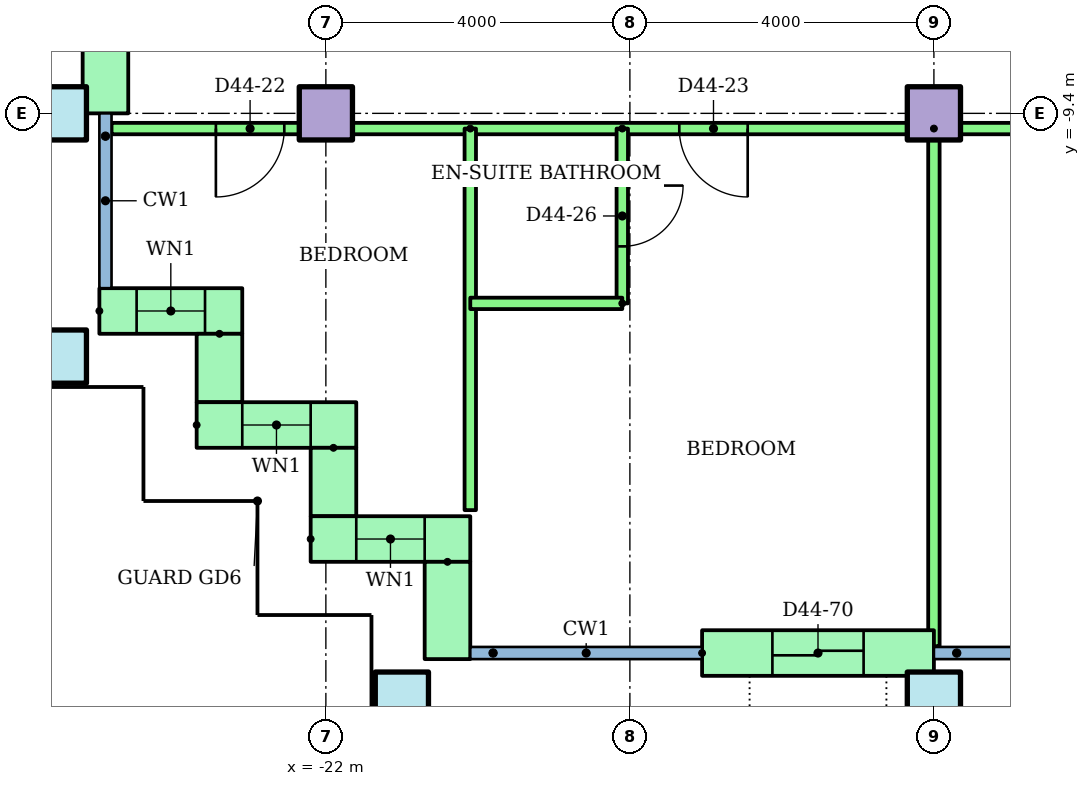
"""IFC4 building model, lengths in metres.
Left out: names, types, materials, properties, quantities, classifications, styles, units other than length and angle.
Written with IfcOpenShell. Run it as: python <this file> out.ifc"""

import sys

from ifc_helpers import new_model, si_unit, direction, frame, frame_2d, origin, origin_2d, place, context, subcontext, project, spatial, rectangle, hollow_rectangle, extrude, element, fill, save


model = new_model("IFC4")
c1 = context("Model", 3, precision=1e-05, world=origin(), true_north=direction((0.0, 1.0)))
c2 = subcontext(c1, "Body", "Model", "MODEL_VIEW")
j1 = project(units=[si_unit("LENGTHUNIT", "METRE"), si_unit("PLANEANGLEUNIT", "RADIAN")], contexts=[c1])
p1 = place(None, origin())
s1 = spatial("IfcSite", under=j1, at=p1, CompositionType="ELEMENT")
p2 = place(p1, origin())
s2 = spatial("IfcBuilding", under=s1, at=p2, CompositionType="ELEMENT")
p3 = place(p2, frame((0.0, 0.0, 171.7)))
s3 = spatial("IfcBuildingStorey", under=s2, at=p3, CompositionType="ELEMENT", Elevation=171.7)
for number, where in (
    (1, (-21.0, -17.1, 0.0)),
    (2, (-14.0, -17.1, 0.0)),
    (3, (-25.5, -12.6, 0.0)),
    (4, (-25.5, -9.4, 0.0)),
):
    element("IfcColumn", number, at=place(p3, frame(where)), inside=s3, PredefinedType="COLUMN", context=c2, shape_type="SweptSolid", body=[
        extrude(hollow_rectangle(XDim=0.7, YDim=0.7, WallThickness=0.036, at=origin_2d()), origin(), (0.0, 0.0, 1.0), 3.2),
    ])
for number, where in (
    (5, (-22.0, -9.4, 0.0)),
    (6, (-14.0, -9.4, 0.0)),
):
    element("IfcColumn", number, at=place(p3, frame(where)), inside=s3, PredefinedType="COLUMN", context=c2, shape_type="SweptSolid", body=[
        extrude(rectangle(XDim=0.7, YDim=0.7, at=origin_2d()), origin(), (0.0, 0.0, 1.0), 3.2),
    ])
p4 = place(p3, frame((-24.9, -5.7, 0.0), z_axis=(0.0, 0.0, 1.0), x_axis=(0.0, -1.0, 0.0)))
e7 = element("IfcWall", 7, at=p4, inside=s3, PredefinedType="STANDARD", context=c2, shape_type="SweptSolid", body=[
    extrude(rectangle(XDim=3.7, YDim=0.6, at=frame_2d((1.85, 0.0))), origin(), (0.0, 0.0, 1.0), 2.92),
])
p5 = place(p4, frame((1.025, 0.0, 0.0)))
e8 = element("IfcOpeningElement", 8, at=p5, cuts=e7, PredefinedType="OPENING", context=c2, shape_type="SweptSolid", body=[
    extrude(rectangle(XDim=1.2, YDim=2.1, at=frame_2d((0.6, 1.05))), frame((0.0, 0.31, 0.0), z_axis=(0.0, -1.0, 0.0), x_axis=(1.0, 0.0, 0.0)), (0.0, 0.0, 1.0), 0.62),
])
p6 = place(p3, frame((-24.98, -12.0, 0.0)))
e9 = element("IfcWall", 9, at=p6, inside=s3, PredefinedType="STANDARD", context=c2, shape_type="SweptSolid", body=[
    extrude(rectangle(XDim=1.88, YDim=0.6, at=frame_2d((0.94, 0.0))), origin(), (0.0, 0.0, 1.0), 2.92),
])
p7 = place(p6, frame((0.49, 0.0, 0.9)))
e10 = element("IfcOpeningElement", 10, at=p7, cuts=e9, PredefinedType="OPENING", context=c2, shape_type="SweptSolid", body=[
    extrude(rectangle(XDim=0.9, YDim=1.5, at=frame_2d((0.45, 0.75))), frame((0.0, 0.31, 0.0), z_axis=(0.0, -1.0, 0.0), x_axis=(1.0, 0.0, 0.0)), (0.0, 0.0, 1.0), 0.62),
])
p8 = place(p3, frame((-23.4, -12.3, 0.0), z_axis=(0.0, 0.0, 1.0), x_axis=(0.0, -1.0, 0.0)))
e11 = element("IfcWall", 11, at=p8, inside=s3, PredefinedType="STANDARD", context=c2, shape_type="SweptSolid", body=[
    extrude(rectangle(XDim=0.9, YDim=0.6, at=frame_2d((0.45, 0.0))), origin(), (0.0, 0.0, 1.0), 2.92),
])
p9 = place(p3, frame((-23.7, -13.5, 0.0)))
e12 = element("IfcWall", 12, at=p9, inside=s3, PredefinedType="STANDARD", context=c2, shape_type="SweptSolid", body=[
    extrude(rectangle(XDim=2.1, YDim=0.6, at=frame_2d((1.05, 0.0))), origin(), (0.0, 0.0, 1.0), 2.92),
])
p10 = place(p9, frame((0.6, 0.0, 0.9)))
e13 = element("IfcOpeningElement", 13, at=p10, cuts=e12, PredefinedType="OPENING", context=c2, shape_type="SweptSolid", body=[
    extrude(rectangle(XDim=0.9, YDim=1.5, at=frame_2d((0.45, 0.75))), frame((0.0, 0.31, 0.0), z_axis=(0.0, -1.0, 0.0), x_axis=(1.0, 0.0, 0.0)), (0.0, 0.0, 1.0), 0.62),
])
p11 = place(p3, frame((-21.9, -13.8, 0.0), z_axis=(0.0, 0.0, 1.0), x_axis=(0.0, -1.0, 0.0)))
e14 = element("IfcWall", 14, at=p11, inside=s3, PredefinedType="STANDARD", context=c2, shape_type="SweptSolid", body=[
    extrude(rectangle(XDim=0.9, YDim=0.6, at=frame_2d((0.45, 0.0))), origin(), (0.0, 0.0, 1.0), 2.92),
])
p12 = place(p3, frame((-22.2, -15.0, 0.0)))
e15 = element("IfcWall", 15, at=p12, inside=s3, PredefinedType="STANDARD", context=c2, shape_type="SweptSolid", body=[
    extrude(rectangle(XDim=2.1, YDim=0.6, at=frame_2d((1.05, 0.0))), origin(), (0.0, 0.0, 1.0), 2.92),
])
p13 = place(p12, frame((0.6, 0.0, 0.9)))
e16 = element("IfcOpeningElement", 16, at=p13, cuts=e15, PredefinedType="OPENING", context=c2, shape_type="SweptSolid", body=[
    extrude(rectangle(XDim=0.9, YDim=1.5, at=frame_2d((0.45, 0.75))), frame((0.0, 0.31, 0.0), z_axis=(0.0, -1.0, 0.0), x_axis=(1.0, 0.0, 0.0)), (0.0, 0.0, 1.0), 0.62),
])
p14 = place(p3, frame((-20.4, -15.3, 0.0), z_axis=(0.0, 0.0, 1.0), x_axis=(0.0, -1.0, 0.0)))
e17 = element("IfcWall", 17, at=p14, inside=s3, PredefinedType="STANDARD", context=c2, shape_type="SweptSolid", body=[
    extrude(rectangle(XDim=1.28, YDim=0.6, at=frame_2d((0.64, 0.0))), origin(), (0.0, 0.0, 1.0), 2.92),
])
p15 = place(p3, frame((-17.05, -16.5, 0.0)))
e18 = element("IfcWall", 18, at=p15, inside=s3, PredefinedType="STANDARD", context=c2, shape_type="SweptSolid", body=[
    extrude(rectangle(XDim=3.05, YDim=0.6, at=frame_2d((1.525, 0.0))), origin(), (0.0, 0.0, 1.0), 2.92),
])
p16 = place(p15, frame((0.925, 0.0, 0.0)))
e19 = element("IfcOpeningElement", 19, at=p16, cuts=e18, PredefinedType="OPENING", context=c2, shape_type="SweptSolid", body=[
    extrude(rectangle(XDim=1.2, YDim=2.1, at=frame_2d((0.6, 1.05))), frame((0.0, 0.31, 0.0), z_axis=(0.0, -1.0, 0.0), x_axis=(1.0, 0.0, 0.0)), (0.0, 0.0, 1.0), 0.62),
])
p17 = place(p3, frame((-6.0, -9.6, 0.0), z_axis=(0.0, 0.0, 1.0), x_axis=(-1.0, 0.0, 0.0)))
e20 = element("IfcWall", 20, at=p17, inside=s3, PredefinedType="PARTITIONING", context=c2, shape_type="SweptSolid", body=[
    extrude(rectangle(XDim=18.82, YDim=0.15, at=frame_2d((9.41, 0.0))), origin(), (0.0, 0.0, 1.0), 2.4),
])
p18 = place(p17, frame((16.547, 0.0, 0.0)))
e21 = element("IfcOpeningElement", 21, at=p18, cuts=e20, PredefinedType="OPENING", context=c2, shape_type="SweptSolid", body=[
    extrude(rectangle(XDim=0.9, YDim=2.1, at=frame_2d((0.45, 1.05))), frame((0.0, 0.085, 0.0), z_axis=(0.0, -1.0, 0.0), x_axis=(1.0, 0.0, 0.0)), (0.0, 0.0, 1.0), 0.17),
])
p19 = place(p17, frame((10.45, 0.0, 0.0)))
e22 = element("IfcOpeningElement", 22, at=p19, cuts=e20, PredefinedType="OPENING", context=c2, shape_type="SweptSolid", body=[
    extrude(rectangle(XDim=0.9, YDim=2.1, at=frame_2d((0.45, 1.05))), frame((0.0, 0.085, 0.0), z_axis=(0.0, -1.0, 0.0), x_axis=(1.0, 0.0, 0.0)), (0.0, 0.0, 1.0), 0.17),
])
p20 = place(p17, frame((5.55, 0.0, 0.0)))
e23 = element("IfcOpeningElement", 23, at=p20, cuts=e20, PredefinedType="OPENING", context=c2, shape_type="SweptSolid", body=[
    extrude(rectangle(XDim=0.9, YDim=2.1, at=frame_2d((0.45, 1.05))), frame((0.0, 0.085, 0.0), z_axis=(0.0, -1.0, 0.0), x_axis=(1.0, 0.0, 0.0)), (0.0, 0.0, 1.0), 0.17),
])
p21 = place(p17, frame((1.5, 0.0, 0.0)))
e24 = element("IfcOpeningElement", 24, at=p21, cuts=e20, PredefinedType="OPENING", context=c2, shape_type="SweptSolid", body=[
    extrude(rectangle(XDim=1.0, YDim=2.1, at=frame_2d((0.5, 1.05))), frame((0.0, 0.085, 0.0), z_axis=(0.0, -1.0, 0.0), x_axis=(1.0, 0.0, 0.0)), (0.0, 0.0, 1.0), 0.17),
])
p22 = place(p3, frame((-20.1, -9.6, 0.0), z_axis=(0.0, 0.0, 1.0), x_axis=(0.0, -1.0, 0.0)))
e25 = element("IfcWall", 25, at=p22, inside=s3, PredefinedType="PARTITIONING", context=c2, shape_type="SweptSolid", body=[
    extrude(rectangle(XDim=5.02, YDim=0.15, at=frame_2d((2.51, 0.0))), origin(), (0.0, 0.0, 1.0), 2.4),
])
p23 = place(p3, frame((-14.0, -9.6, 0.0), z_axis=(0.0, 0.0, 1.0), x_axis=(0.0, -1.0, 0.0)))
e26 = element("IfcWall", 26, at=p23, inside=s3, PredefinedType="PARTITIONING", context=c2, shape_type="SweptSolid", body=[
    extrude(rectangle(XDim=6.81, YDim=0.15, at=frame_2d((3.405, 0.0))), origin(), (0.0, 0.0, 1.0), 2.4),
])
p24 = place(p3, frame((-18.1, -9.6, 0.0), z_axis=(0.0, 0.0, 1.0), x_axis=(0.0, -1.0, 0.0)))
e27 = element("IfcWall", 27, at=p24, inside=s3, PredefinedType="PARTITIONING", context=c2, shape_type="SweptSolid", body=[
    extrude(rectangle(XDim=2.3, YDim=0.15, at=frame_2d((1.15, 0.0))), origin(), (0.0, 0.0, 1.0), 2.4),
])
p25 = place(p24, frame((0.75, 0.0, 0.0)))
e28 = element("IfcOpeningElement", 28, at=p25, cuts=e27, PredefinedType="OPENING", context=c2, shape_type="SweptSolid", body=[
    extrude(rectangle(XDim=0.8, YDim=2.1, at=frame_2d((0.4, 1.05))), frame((0.0, 0.085, 0.0), z_axis=(0.0, -1.0, 0.0), x_axis=(1.0, 0.0, 0.0)), (0.0, 0.0, 1.0), 0.17),
])
p26 = place(p3, frame((-18.1, -11.9, 0.0), z_axis=(0.0, 0.0, 1.0), x_axis=(-1.0, 0.0, 0.0)))
e29 = element("IfcWall", 29, at=p26, inside=s3, PredefinedType="PARTITIONING", context=c2, shape_type="SweptSolid", body=[
    extrude(rectangle(XDim=2.0, YDim=0.15, at=frame_2d((1.0, 0.0))), origin(), (0.0, 0.0, 1.0), 2.4),
])
p27 = place(p7, origin())
e30 = element("IfcWindow", 30, at=p27, inside=s3, PartitioningType="SINGLE_PANEL", PredefinedType="WINDOW", context=c2, shape_type="SweptSolid", body=[
    extrude(rectangle(XDim=0.9, YDim=1.5, at=frame_2d((0.45, 0.75))), frame((0.0, 0.03, 0.0), z_axis=(0.0, -1.0, 0.0), x_axis=(1.0, 0.0, 0.0)), (0.0, 0.0, 1.0), 0.06),
])
fill(e10, e30)
p28 = place(p10, origin())
e31 = element("IfcWindow", 31, at=p28, inside=s3, PartitioningType="SINGLE_PANEL", PredefinedType="WINDOW", context=c2, shape_type="SweptSolid", body=[
    extrude(rectangle(XDim=0.9, YDim=1.5, at=frame_2d((0.45, 0.75))), frame((0.0, 0.03, 0.0), z_axis=(0.0, -1.0, 0.0), x_axis=(1.0, 0.0, 0.0)), (0.0, 0.0, 1.0), 0.06),
])
fill(e13, e31)
p29 = place(p13, origin())
e32 = element("IfcWindow", 32, at=p29, inside=s3, PartitioningType="SINGLE_PANEL", PredefinedType="WINDOW", context=c2, shape_type="SweptSolid", body=[
    extrude(rectangle(XDim=0.9, YDim=1.5, at=frame_2d((0.45, 0.75))), frame((0.0, 0.03, 0.0), z_axis=(0.0, -1.0, 0.0), x_axis=(1.0, 0.0, 0.0)), (0.0, 0.0, 1.0), 0.06),
])
fill(e16, e32)
p30 = place(p18, origin())
e33 = element("IfcDoor", 33, at=p30, inside=s3, OperationType="SINGLE_SWING_RIGHT", PredefinedType="DOOR", context=c2, shape_type="SweptSolid", body=[
    extrude(rectangle(XDim=0.9, YDim=2.1, at=frame_2d((0.45, 1.05))), frame((0.0, 0.025, 0.0), z_axis=(0.0, -1.0, 0.0), x_axis=(1.0, 0.0, 0.0)), (0.0, 0.0, 1.0), 0.05),
])
fill(e21, e33)
p31 = place(p19, origin())
e34 = element("IfcDoor", 34, at=p31, inside=s3, OperationType="SINGLE_SWING_LEFT", PredefinedType="DOOR", context=c2, shape_type="SweptSolid", body=[
    extrude(rectangle(XDim=0.9, YDim=2.1, at=frame_2d((0.45, 1.05))), frame((0.0, 0.025, 0.0), z_axis=(0.0, -1.0, 0.0), x_axis=(1.0, 0.0, 0.0)), (0.0, 0.0, 1.0), 0.05),
])
fill(e22, e34)
p32 = place(p25, origin())
e35 = element("IfcDoor", 35, at=p32, inside=s3, OperationType="SINGLE_SWING_LEFT", PredefinedType="DOOR", context=c2, shape_type="SweptSolid", body=[
    extrude(rectangle(XDim=0.8, YDim=2.1, at=frame_2d((0.4, 1.05))), frame((0.0, 0.025, 0.0), z_axis=(0.0, -1.0, 0.0), x_axis=(1.0, 0.0, 0.0)), (0.0, 0.0, 1.0), 0.05),
])
fill(e28, e35)
p33 = place(p16, origin())
e36 = element("IfcDoor", 36, at=p33, inside=s3, OperationType="SLIDING_TO_LEFT", PredefinedType="DOOR", context=c2, shape_type="SweptSolid", body=[
    extrude(rectangle(XDim=1.2, YDim=2.1, at=frame_2d((0.6, 1.05))), frame((0.0, 0.025, 0.0), z_axis=(0.0, -1.0, 0.0), x_axis=(1.0, 0.0, 0.0)), (0.0, 0.0, 1.0), 0.05),
])
fill(e19, e36)
save(model, sys.argv[1])
